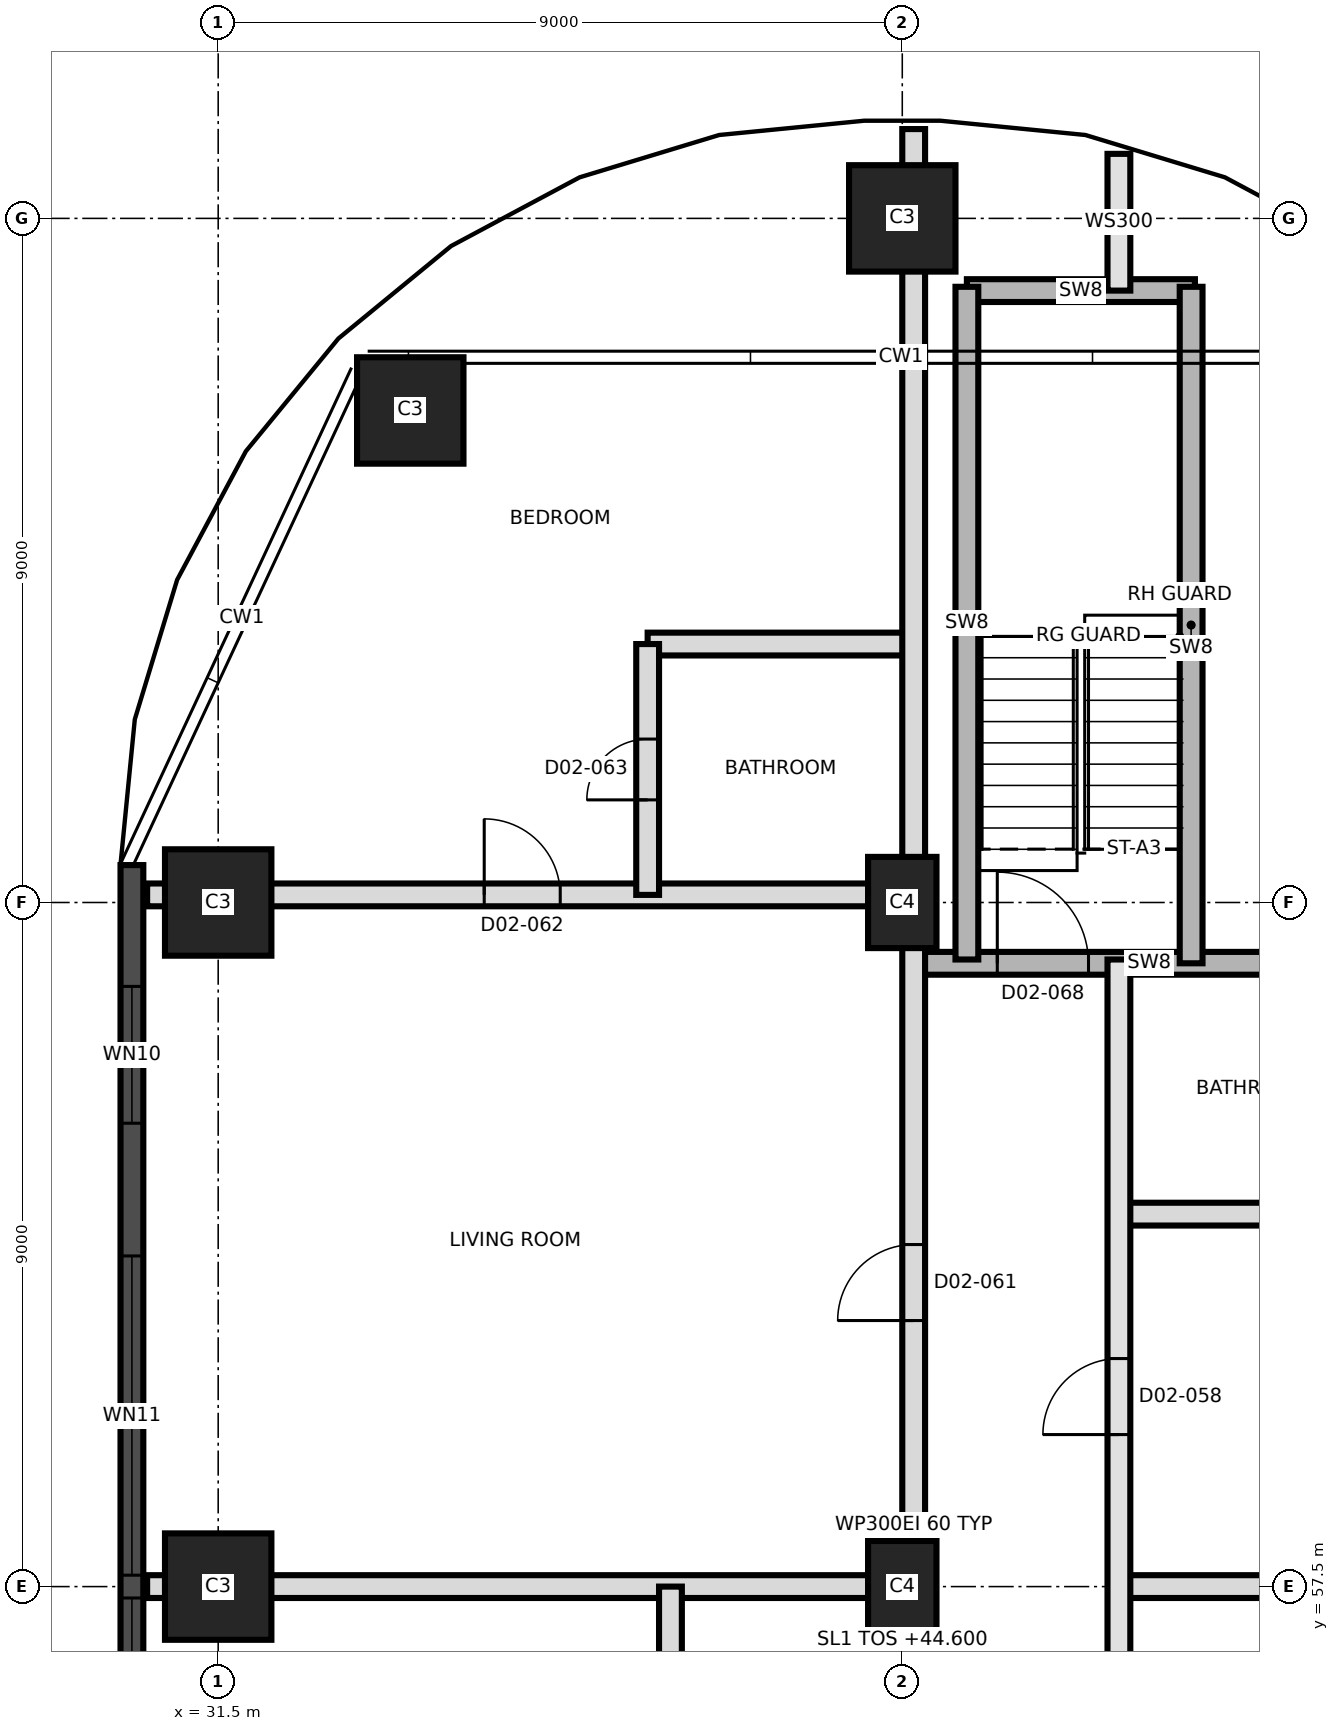
"""IFC4 building model, lengths in metres.
Left out: names, types, materials, properties, quantities, classifications, styles, units other than length and angle.
Written with IfcOpenShell. Run it as: python <this file> out.ifc"""

import sys

from ifc_helpers import new_model, si_unit, direction, frame, frame_2d, origin, origin_2d, place, context, subcontext, project, spatial, rectangle, extrude, element, fill, save


model = new_model("IFC4")
c1 = context("Model", 3, precision=1e-05, world=origin(), true_north=direction((0.0, 1.0)))
c2 = subcontext(c1, "Body", "Model", "MODEL_VIEW")
j1 = project(units=[si_unit("LENGTHUNIT", "METRE"), si_unit("PLANEANGLEUNIT", "RADIAN")], contexts=[c1])
p1 = place(None, origin())
s1 = spatial("IfcSite", under=j1, at=p1, CompositionType="ELEMENT")
p2 = place(p1, origin())
s2 = spatial("IfcBuilding", under=s1, at=p2, CompositionType="ELEMENT")
p3 = place(p2, frame((0.0, 0.0, 44.6)))
s3 = spatial("IfcBuildingStorey", under=s2, at=p3, CompositionType="ELEMENT", Elevation=44.6)
p4 = place(p3, frame((31.5, 57.5, 0.0), z_axis=(0.0, 0.0, 1.0), x_axis=(1.0, 0.0, 0.0)))
e1 = element("IfcColumn", 1, at=p4, inside=s3, PredefinedType="COLUMN", context=c2, shape_type="SweptSolid", body=[
    extrude(rectangle(XDim=1.4, YDim=1.4, at=origin_2d()), origin(), (0.0, 0.0, 1.0), 3.7),
])
p5 = place(p3, frame((40.5, 57.5, 0.0), z_axis=(0.0, 0.0, 1.0), x_axis=(0.0, 1.0, 0.0)))
e2 = element("IfcColumn", 2, at=p5, inside=s3, PredefinedType="COLUMN", context=c2, shape_type="SweptSolid", body=[
    extrude(rectangle(XDim=1.2, YDim=0.9, at=origin_2d()), origin(), (0.0, 0.0, 1.0), 3.7),
])
p6 = place(p3, frame((31.5, 66.5, 0.0), z_axis=(0.0, 0.0, 1.0), x_axis=(1.0, 0.0, 0.0)))
e3 = element("IfcColumn", 3, at=p6, inside=s3, PredefinedType="COLUMN", context=c2, shape_type="SweptSolid", body=[
    extrude(rectangle(XDim=1.4, YDim=1.4, at=origin_2d()), origin(), (0.0, 0.0, 1.0), 3.7),
])
p7 = place(p3, frame((40.5, 66.5, 0.0), z_axis=(0.0, 0.0, 1.0), x_axis=(0.0, 1.0, 0.0)))
e4 = element("IfcColumn", 4, at=p7, inside=s3, PredefinedType="COLUMN", context=c2, shape_type="SweptSolid", body=[
    extrude(rectangle(XDim=1.2, YDim=0.9, at=origin_2d()), origin(), (0.0, 0.0, 1.0), 3.7),
])
for number, where, z_axis, x_axis in (
    (5, (34.027, 72.973, 0.0), (0.0, 0.0, 1.0), (1.0, 0.0, 0.0)),
    (6, (40.5, 75.5, 0.0), (0.0, 0.0, 1.0), (1.0, 0.0, 0.0)),
):
    element("IfcColumn", number, at=place(p3, frame(where, z_axis=z_axis, x_axis=x_axis)), inside=s3, PredefinedType="COLUMN", context=c2, shape_type="SweptSolid", body=[
        extrude(rectangle(XDim=1.4, YDim=1.4, at=origin_2d()), origin(), (0.0, 0.0, 1.0), 3.7),
    ])
p8 = place(p3, frame((30.365, 66.992, 0.0), z_axis=(0.0, 0.0, 1.0), x_axis=(0.0, -1.0, 0.0)))
e7 = element("IfcWall", 7, at=p8, inside=s3, PredefinedType="SOLIDWALL", context=c2, shape_type="SweptSolid", body=[
    extrude(rectangle(XDim=32.981, YDim=0.3, at=frame_2d((16.491, 0.0))), origin(), (0.0, 0.0, 1.0), 3.4),
])
p9 = place(p8, frame((1.596, 0.0, 0.3)))
e8 = element("IfcOpeningElement", 8, at=p9, cuts=e7, PredefinedType="OPENING", context=c2, shape_type="SweptSolid", body=[
    extrude(rectangle(XDim=1.8, YDim=2.4, at=frame_2d((0.9, 1.2))), frame((0.0, 0.16, 0.0), z_axis=(0.0, -1.0, 0.0), x_axis=(1.0, 0.0, 0.0)), (0.0, 0.0, 1.0), 0.32),
])
p10 = place(p8, frame((5.142, 0.0, 0.9)))
e9 = element("IfcOpeningElement", 9, at=p10, cuts=e7, PredefinedType="OPENING", context=c2, shape_type="SweptSolid", body=[
    extrude(rectangle(XDim=4.2, YDim=1.5, at=frame_2d((2.1, 0.75))), frame((0.0, 0.16, 0.0), z_axis=(0.0, -1.0, 0.0), x_axis=(1.0, 0.0, 0.0)), (0.0, 0.0, 1.0), 0.32),
])
p11 = place(p8, frame((9.642, 0.0, 0.9)))
e10 = element("IfcOpeningElement", 10, at=p11, cuts=e7, PredefinedType="OPENING", context=c2, shape_type="SweptSolid", body=[
    extrude(rectangle(XDim=4.2, YDim=1.5, at=frame_2d((2.1, 0.75))), frame((0.0, 0.16, 0.0), z_axis=(0.0, -1.0, 0.0), x_axis=(1.0, 0.0, 0.0)), (0.0, 0.0, 1.0), 0.32),
])
p12 = place(p8, frame((14.142, 0.0, 0.9)))
e11 = element("IfcOpeningElement", 11, at=p12, cuts=e7, PredefinedType="OPENING", context=c2, shape_type="SweptSolid", body=[
    extrude(rectangle(XDim=4.2, YDim=1.5, at=frame_2d((2.1, 0.75))), frame((0.0, 0.16, 0.0), z_axis=(0.0, -1.0, 0.0), x_axis=(1.0, 0.0, 0.0)), (0.0, 0.0, 1.0), 0.32),
])
p13 = place(p8, frame((18.642, 0.0, 0.9)))
e12 = element("IfcOpeningElement", 12, at=p13, cuts=e7, PredefinedType="OPENING", context=c2, shape_type="SweptSolid", body=[
    extrude(rectangle(XDim=4.2, YDim=1.5, at=frame_2d((2.1, 0.75))), frame((0.0, 0.16, 0.0), z_axis=(0.0, -1.0, 0.0), x_axis=(1.0, 0.0, 0.0)), (0.0, 0.0, 1.0), 0.32),
])
p14 = place(p8, frame((23.142, 0.0, 0.9)))
e13 = element("IfcOpeningElement", 13, at=p14, cuts=e7, PredefinedType="OPENING", context=c2, shape_type="SweptSolid", body=[
    extrude(rectangle(XDim=4.2, YDim=1.5, at=frame_2d((2.1, 0.75))), frame((0.0, 0.16, 0.0), z_axis=(0.0, -1.0, 0.0), x_axis=(1.0, 0.0, 0.0)), (0.0, 0.0, 1.0), 0.32),
])
p15 = place(p8, frame((29.337, 0.0, 0.3)))
e14 = element("IfcOpeningElement", 14, at=p15, cuts=e7, PredefinedType="OPENING", context=c2, shape_type="SweptSolid", body=[
    extrude(rectangle(XDim=1.8, YDim=2.4, at=frame_2d((0.9, 1.2))), frame((0.0, 0.16, 0.0), z_axis=(0.0, -1.0, 0.0), x_axis=(1.0, 0.0, 0.0)), (0.0, 0.0, 1.0), 0.32),
])
p16 = place(p3, frame((30.565, 57.5, 0.0), z_axis=(0.0, 0.0, 1.0), x_axis=(1.0, 0.0, 0.0)))
e15 = element("IfcWall", 15, at=p16, inside=s3, PredefinedType="PARTITIONING", context=c2, shape_type="SweptSolid", body=[
    extrude(rectangle(XDim=10.085, YDim=0.3, at=frame_2d((5.042, 0.0))), origin(), (0.0, 0.0, 1.0), 3.4),
])
p17 = place(p3, frame((43.35, 57.5, 0.0), z_axis=(0.0, 0.0, 1.0), x_axis=(1.0, 0.0, 0.0)))
e16 = element("IfcWall", 16, at=p17, inside=s3, PredefinedType="PARTITIONING", context=c2, shape_type="SweptSolid", body=[
    extrude(rectangle(XDim=7.265, YDim=0.3, at=frame_2d((3.632, 0.0))), origin(), (0.0, 0.0, 1.0), 3.4),
])
p18 = place(p3, frame((43.35, 62.4, 0.0), z_axis=(0.0, 0.0, 1.0), x_axis=(1.0, 0.0, 0.0)))
e17 = element("IfcWall", 17, at=p18, inside=s3, PredefinedType="PARTITIONING", context=c2, shape_type="SweptSolid", body=[
    extrude(rectangle(XDim=7.265, YDim=0.3, at=frame_2d((3.632, 0.0))), origin(), (0.0, 0.0, 1.0), 3.4),
])
p19 = place(p18, frame((4.65, 0.0, 0.0)))
e18 = element("IfcOpeningElement", 18, at=p19, cuts=e17, PredefinedType="OPENING", context=c2, shape_type="SweptSolid", body=[
    extrude(rectangle(XDim=1.0, YDim=2.1, at=frame_2d((0.5, 1.05))), frame((0.0, 0.16, 0.0), z_axis=(0.0, -1.0, 0.0), x_axis=(1.0, 0.0, 0.0)), (0.0, 0.0, 1.0), 0.32),
])
p20 = place(p3, frame((40.65, 65.7, 0.0), z_axis=(0.0, 0.0, 1.0), x_axis=(1.0, 0.0, 0.0)))
e19 = element("IfcWall", 19, at=p20, inside=s3, PredefinedType="SHEAR", context=c2, shape_type="SweptSolid", body=[
    extrude(rectangle(XDim=6.2, YDim=0.3, at=frame_2d((3.1, 0.0))), origin(), (0.0, 0.0, 1.0), 3.4),
])
p21 = place(p20, frame((1.1, 0.0, 0.0)))
e20 = element("IfcOpeningElement", 20, at=p21, cuts=e19, PredefinedType="OPENING", context=c2, shape_type="SweptSolid", body=[
    extrude(rectangle(XDim=1.2, YDim=2.1, at=frame_2d((0.6, 1.05))), frame((0.0, 0.16, 0.0), z_axis=(0.0, -1.0, 0.0), x_axis=(1.0, 0.0, 0.0)), (0.0, 0.0, 1.0), 0.32),
])
p22 = place(p3, frame((30.565, 66.6, 0.0), z_axis=(0.0, 0.0, 1.0), x_axis=(1.0, 0.0, 0.0)))
e21 = element("IfcWall", 21, at=p22, inside=s3, PredefinedType="PARTITIONING", context=c2, shape_type="SweptSolid", body=[
    extrude(rectangle(XDim=10.085, YDim=0.3, at=frame_2d((5.042, 0.0))), origin(), (0.0, 0.0, 1.0), 3.4),
])
p23 = place(p22, frame((4.435, 0.0, 0.0)))
e22 = element("IfcOpeningElement", 22, at=p23, cuts=e21, PredefinedType="OPENING", context=c2, shape_type="SweptSolid", body=[
    extrude(rectangle(XDim=1.0, YDim=2.1, at=frame_2d((0.5, 1.05))), frame((0.0, 0.16, 0.0), z_axis=(0.0, -1.0, 0.0), x_axis=(1.0, 0.0, 0.0)), (0.0, 0.0, 1.0), 0.32),
])
p24 = place(p3, frame((37.15, 69.9, 0.0), z_axis=(0.0, 0.0, 1.0), x_axis=(1.0, 0.0, 0.0)))
e23 = element("IfcWall", 23, at=p24, inside=s3, PredefinedType="PARTITIONING", context=c2, shape_type="SweptSolid", body=[
    extrude(rectangle(XDim=3.5, YDim=0.3, at=frame_2d((1.75, 0.0))), origin(), (0.0, 0.0, 1.0), 3.4),
])
p25 = place(p3, frame((41.35, 74.55, 0.0), z_axis=(0.0, 0.0, 1.0), x_axis=(1.0, 0.0, 0.0)))
e24 = element("IfcWall", 24, at=p25, inside=s3, PredefinedType="SHEAR", context=c2, shape_type="SweptSolid", body=[
    extrude(rectangle(XDim=3.0, YDim=0.3, at=frame_2d((1.5, 0.0))), origin(), (0.0, 0.0, 1.0), 3.4),
])
p26 = place(p3, frame((37.15, 66.6, 0.0), z_axis=(0.0, 0.0, 1.0), x_axis=(0.0, 1.0, 0.0)))
e25 = element("IfcWall", 25, at=p26, inside=s3, PredefinedType="PARTITIONING", context=c2, shape_type="SweptSolid", body=[
    extrude(rectangle(XDim=3.3, YDim=0.3, at=frame_2d((1.65, 0.0))), origin(), (0.0, 0.0, 1.0), 3.4),
])
p27 = place(p26, frame((1.25, 0.0, 0.0)))
e26 = element("IfcOpeningElement", 26, at=p27, cuts=e25, PredefinedType="OPENING", context=c2, shape_type="SweptSolid", body=[
    extrude(rectangle(XDim=0.8, YDim=2.1, at=frame_2d((0.4, 1.05))), frame((0.0, 0.16, 0.0), z_axis=(0.0, -1.0, 0.0), x_axis=(1.0, 0.0, 0.0)), (0.0, 0.0, 1.0), 0.32),
])
p28 = place(p3, frame((37.45, 54.8, 0.0), z_axis=(0.0, 0.0, 1.0), x_axis=(0.0, 1.0, 0.0)))
e27 = element("IfcWall", 27, at=p28, inside=s3, PredefinedType="PARTITIONING", context=c2, shape_type="SweptSolid", body=[
    extrude(rectangle(XDim=2.7, YDim=0.3, at=frame_2d((1.35, 0.0))), origin(), (0.0, 0.0, 1.0), 3.4),
])
p29 = place(p28, frame((0.95, 0.0, 0.0)))
e28 = element("IfcOpeningElement", 28, at=p29, cuts=e27, PredefinedType="OPENING", context=c2, shape_type="SweptSolid", body=[
    extrude(rectangle(XDim=0.8, YDim=2.1, at=frame_2d((0.4, 1.05))), frame((0.0, 0.16, 0.0), z_axis=(0.0, -1.0, 0.0), x_axis=(1.0, 0.0, 0.0)), (0.0, 0.0, 1.0), 0.32),
])
p30 = place(p3, frame((40.65, 39.95, 0.0), z_axis=(0.0, 0.0, 1.0), x_axis=(0.0, 1.0, 0.0)))
e29 = element("IfcWall", 29, at=p30, inside=s3, PredefinedType="PARTITIONING", context=c2, shape_type="SweptSolid", body=[
    extrude(rectangle(XDim=36.725, YDim=0.3, at=frame_2d((18.363, 0.0))), origin(), (0.0, 0.0, 1.0), 3.4),
])
p31 = place(p30, frame((0.685, 0.0, 0.0)))
e30 = element("IfcOpeningElement", 30, at=p31, cuts=e29, PredefinedType="OPENING", context=c2, shape_type="SweptSolid", body=[
    extrude(rectangle(XDim=1.2, YDim=2.1, at=frame_2d((0.6, 1.05))), frame((0.0, 0.16, 0.0), z_axis=(0.0, -1.0, 0.0), x_axis=(1.0, 0.0, 0.0)), (0.0, 0.0, 1.0), 0.32),
])
p32 = place(p30, frame((3.935, 0.0, 0.0)))
e31 = element("IfcOpeningElement", 31, at=p32, cuts=e29, PredefinedType="OPENING", context=c2, shape_type="SweptSolid", body=[
    extrude(rectangle(XDim=1.0, YDim=2.1, at=frame_2d((0.5, 1.05))), frame((0.0, 0.16, 0.0), z_axis=(0.0, -1.0, 0.0), x_axis=(1.0, 0.0, 0.0)), (0.0, 0.0, 1.0), 0.32),
])
p33 = place(p30, frame((11.83, 0.0, 0.0)))
e32 = element("IfcOpeningElement", 32, at=p33, cuts=e29, PredefinedType="OPENING", context=c2, shape_type="SweptSolid", body=[
    extrude(rectangle(XDim=1.0, YDim=2.1, at=frame_2d((0.5, 1.05))), frame((0.0, 0.16, 0.0), z_axis=(0.0, -1.0, 0.0), x_axis=(1.0, 0.0, 0.0)), (0.0, 0.0, 1.0), 0.32),
])
p34 = place(p30, frame((13.63, 0.0, 0.0)))
e33 = element("IfcOpeningElement", 33, at=p34, cuts=e29, PredefinedType="OPENING", context=c2, shape_type="SweptSolid", body=[
    extrude(rectangle(XDim=1.0, YDim=2.1, at=frame_2d((0.5, 1.05))), frame((0.0, 0.16, 0.0), z_axis=(0.0, -1.0, 0.0), x_axis=(1.0, 0.0, 0.0)), (0.0, 0.0, 1.0), 0.32),
])
p35 = place(p30, frame((21.05, 0.0, 0.0)))
e34 = element("IfcOpeningElement", 34, at=p35, cuts=e29, PredefinedType="OPENING", context=c2, shape_type="SweptSolid", body=[
    extrude(rectangle(XDim=1.0, YDim=2.4, at=frame_2d((0.5, 1.2))), frame((0.0, 0.16, 0.0), z_axis=(0.0, -1.0, 0.0), x_axis=(1.0, 0.0, 0.0)), (0.0, 0.0, 1.0), 0.32),
])
p36 = place(p3, frame((41.35, 65.75, 0.0), z_axis=(0.0, 0.0, 1.0), x_axis=(0.0, 1.0, 0.0)))
e35 = element("IfcWall", 35, at=p36, inside=s3, PredefinedType="SHEAR", context=c2, shape_type="SweptSolid", body=[
    extrude(rectangle(XDim=8.85, YDim=0.3, at=frame_2d((4.425, 0.0))), origin(), (0.0, 0.0, 1.0), 3.4),
])
p37 = place(p3, frame((43.35, 39.95, 0.0), z_axis=(0.0, 0.0, 1.0), x_axis=(0.0, 1.0, 0.0)))
e36 = element("IfcWall", 36, at=p37, inside=s3, PredefinedType="SOLIDWALL", context=c2, shape_type="SweptSolid", body=[
    extrude(rectangle(XDim=25.8, YDim=0.3, at=frame_2d((12.9, 0.0))), origin(), (0.0, 0.0, 1.0), 3.4),
])
p38 = place(p37, frame((3.55, 0.0, 0.0)))
e37 = element("IfcOpeningElement", 37, at=p38, cuts=e36, PredefinedType="OPENING", context=c2, shape_type="SweptSolid", body=[
    extrude(rectangle(XDim=1.0, YDim=2.4, at=frame_2d((0.5, 1.2))), frame((0.0, 0.16, 0.0), z_axis=(0.0, -1.0, 0.0), x_axis=(1.0, 0.0, 0.0)), (0.0, 0.0, 1.0), 0.32),
])
p39 = place(p37, frame((9.7, 0.0, 0.0)))
e38 = element("IfcOpeningElement", 38, at=p39, cuts=e36, PredefinedType="OPENING", context=c2, shape_type="SweptSolid", body=[
    extrude(rectangle(XDim=1.0, YDim=2.1, at=frame_2d((0.5, 1.05))), frame((0.0, 0.16, 0.0), z_axis=(0.0, -1.0, 0.0), x_axis=(1.0, 0.0, 0.0)), (0.0, 0.0, 1.0), 0.32),
])
p40 = place(p37, frame((15.55, 0.0, 0.0)))
e39 = element("IfcOpeningElement", 39, at=p40, cuts=e36, PredefinedType="OPENING", context=c2, shape_type="SweptSolid", body=[
    extrude(rectangle(XDim=1.0, YDim=2.1, at=frame_2d((0.5, 1.05))), frame((0.0, 0.16, 0.0), z_axis=(0.0, -1.0, 0.0), x_axis=(1.0, 0.0, 0.0)), (0.0, 0.0, 1.0), 0.32),
])
p41 = place(p37, frame((19.55, 0.0, 0.0)))
e40 = element("IfcOpeningElement", 40, at=p41, cuts=e36, PredefinedType="OPENING", context=c2, shape_type="SweptSolid", body=[
    extrude(rectangle(XDim=1.0, YDim=2.4, at=frame_2d((0.5, 1.2))), frame((0.0, 0.16, 0.0), z_axis=(0.0, -1.0, 0.0), x_axis=(1.0, 0.0, 0.0)), (0.0, 0.0, 1.0), 0.32),
])
p42 = place(p3, frame((43.35, 74.55, 0.0), z_axis=(0.0, 0.0, 1.0), x_axis=(0.0, 1.0, 0.0)))
e41 = element("IfcWall", 41, at=p42, inside=s3, PredefinedType="SOLIDWALL", context=c2, shape_type="SweptSolid", body=[
    extrude(rectangle(XDim=1.799, YDim=0.3, at=frame_2d((0.899, 0.0))), origin(), (0.0, 0.0, 1.0), 3.4),
])
p43 = place(p3, frame((44.3, 65.7, 0.0), z_axis=(0.0, 0.0, 1.0), x_axis=(0.0, 1.0, 0.0)))
e42 = element("IfcWall", 42, at=p43, inside=s3, PredefinedType="SHEAR", context=c2, shape_type="SweptSolid", body=[
    extrude(rectangle(XDim=8.9, YDim=0.3, at=frame_2d((4.45, 0.0))), origin(), (0.0, 0.0, 1.0), 3.4),
])
p44 = place(p9, origin())
e43 = element("IfcWindow", 43, at=p44, inside=s3, PartitioningType="SINGLE_PANEL", PredefinedType="WINDOW", context=c2, shape_type="SweptSolid", body=[
    extrude(rectangle(XDim=1.8, YDim=2.4, at=frame_2d((0.9, 1.2))), frame((0.0, 0.03, 0.0), z_axis=(0.0, -1.0, 0.0), x_axis=(1.0, 0.0, 0.0)), (0.0, 0.0, 1.0), 0.06),
])
fill(e8, e43)
p45 = place(p10, origin())
e44 = element("IfcWindow", 44, at=p45, inside=s3, PartitioningType="SINGLE_PANEL", PredefinedType="WINDOW", context=c2, shape_type="SweptSolid", body=[
    extrude(rectangle(XDim=4.2, YDim=1.5, at=frame_2d((2.1, 0.75))), frame((0.0, 0.03, 0.0), z_axis=(0.0, -1.0, 0.0), x_axis=(1.0, 0.0, 0.0)), (0.0, 0.0, 1.0), 0.06),
])
fill(e9, e44)
p46 = place(p11, origin())
e45 = element("IfcWindow", 45, at=p46, inside=s3, PartitioningType="SINGLE_PANEL", PredefinedType="WINDOW", context=c2, shape_type="SweptSolid", body=[
    extrude(rectangle(XDim=4.2, YDim=1.5, at=frame_2d((2.1, 0.75))), frame((0.0, 0.03, 0.0), z_axis=(0.0, -1.0, 0.0), x_axis=(1.0, 0.0, 0.0)), (0.0, 0.0, 1.0), 0.06),
])
fill(e10, e45)
p47 = place(p41, origin())
e46 = element("IfcDoor", 46, at=p47, inside=s3, OperationType="SINGLE_SWING_RIGHT", PredefinedType="DOOR", context=c2, shape_type="SweptSolid", body=[
    extrude(rectangle(XDim=1.0, YDim=2.4, at=frame_2d((0.5, 1.2))), frame((0.0, 0.025, 0.0), z_axis=(0.0, -1.0, 0.0), x_axis=(1.0, 0.0, 0.0)), (0.0, 0.0, 1.0), 0.05),
])
fill(e40, e46)
p48 = place(p35, origin())
e47 = element("IfcDoor", 47, at=p48, inside=s3, OperationType="SINGLE_SWING_RIGHT", PredefinedType="DOOR", context=c2, shape_type="SweptSolid", body=[
    extrude(rectangle(XDim=1.0, YDim=2.4, at=frame_2d((0.5, 1.2))), frame((0.0, 0.025, 0.0), z_axis=(0.0, -1.0, 0.0), x_axis=(1.0, 0.0, 0.0)), (0.0, 0.0, 1.0), 0.05),
])
fill(e34, e47)
p49 = place(p23, origin())
e48 = element("IfcDoor", 48, at=p49, inside=s3, OperationType="SINGLE_SWING_LEFT", PredefinedType="DOOR", context=c2, shape_type="SweptSolid", body=[
    extrude(rectangle(XDim=1.0, YDim=2.1, at=frame_2d((0.5, 1.05))), frame((0.0, 0.025, 0.0), z_axis=(0.0, -1.0, 0.0), x_axis=(1.0, 0.0, 0.0)), (0.0, 0.0, 1.0), 0.05),
])
fill(e22, e48)
p50 = place(p27, origin())
e49 = element("IfcDoor", 49, at=p50, inside=s3, OperationType="SINGLE_SWING_LEFT", PredefinedType="DOOR", context=c2, shape_type="SweptSolid", body=[
    extrude(rectangle(XDim=0.8, YDim=2.1, at=frame_2d((0.4, 1.05))), frame((0.0, 0.025, 0.0), z_axis=(0.0, -1.0, 0.0), x_axis=(1.0, 0.0, 0.0)), (0.0, 0.0, 1.0), 0.05),
])
fill(e26, e49)
p51 = place(p21, origin())
e50 = element("IfcDoor", 50, at=p51, inside=s3, OperationType="SINGLE_SWING_RIGHT", PredefinedType="DOOR", context=c2, shape_type="SweptSolid", body=[
    extrude(rectangle(XDim=1.2, YDim=2.1, at=frame_2d((0.6, 1.05))), frame((0.0, 0.025, 0.0), z_axis=(0.0, -1.0, 0.0), x_axis=(1.0, 0.0, 0.0)), (0.0, 0.0, 1.0), 0.05),
])
fill(e20, e50)
save(model, sys.argv[1])
